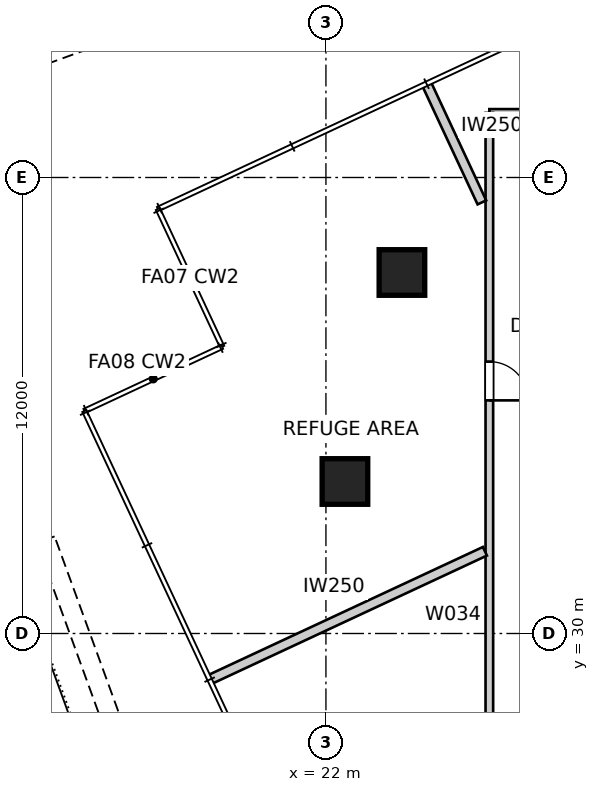
"""IFC4 building model, lengths in metres.
Left out: names, types, materials, properties, quantities, classifications, styles, units other than length and angle.
Written with IfcOpenShell. Run it as: python <this file> out.ifc"""

import sys

from ifc_helpers import new_model, si_unit, direction, frame, frame_2d, origin, origin_2d, place, context, subcontext, project, spatial, rectangle, extrude, element, fill, save


model = new_model("IFC4")
c1 = context("Model", 3, precision=1e-05, world=origin(), true_north=direction((0.0, 1.0)))
c2 = subcontext(c1, "Body", "Model", "MODEL_VIEW")
j1 = project(units=[si_unit("LENGTHUNIT", "METRE"), si_unit("PLANEANGLEUNIT", "RADIAN")], contexts=[c1])
p1 = place(None, origin())
s1 = spatial("IfcSite", under=j1, at=p1, CompositionType="ELEMENT")
p2 = place(p1, origin())
s2 = spatial("IfcBuilding", under=s1, at=p2, CompositionType="ELEMENT")
p3 = place(p2, frame((0.0, 0.0, 171.0)))
s3 = spatial("IfcBuildingStorey", under=s2, at=p3, CompositionType="ELEMENT", Elevation=171.0)
for number, where, z_axis, x_axis in (
    (1, (24.0, 39.5, 0.0), (0.0, 0.0, 1.0), (1.0, 0.0, 0.0)),
    (2, (22.5, 34.0, 0.0), (0.0, 0.0, 1.0), (1.0, 0.0, 0.0)),
):
    element("IfcColumn", number, at=place(p3, frame(where, z_axis=z_axis, x_axis=x_axis)), inside=s3, PredefinedType="COLUMN", context=c2, shape_type="SweptSolid", body=[
        extrude(rectangle(XDim=1.2, YDim=1.2, at=origin_2d()), origin(), (0.0, 0.0, 1.0), 5.0),
    ])
p4 = place(p3, frame((53.7, 43.7, 0.0), z_axis=(0.0, 0.0, 1.0), x_axis=(-1.0, 0.0, 0.0)))
e3 = element("IfcWall", 3, at=p4, inside=s3, PredefinedType="PARTITIONING", context=c2, shape_type="SweptSolid", body=[
    extrude(rectangle(XDim=27.4, YDim=0.2, at=frame_2d((13.7, 0.0))), origin(), (0.0, 0.0, 1.0), 4.85),
])
p5 = place(p4, frame((21.876, 0.0, 0.0)))
e4 = element("IfcOpeningElement", 4, at=p5, cuts=e3, PredefinedType="OPENING", context=c2, shape_type="SweptSolid", body=[
    extrude(rectangle(XDim=1.02, YDim=2.34, at=frame_2d((0.51, 1.17))), frame((0.0, 0.11, 0.0), z_axis=(0.0, -1.0, 0.0), x_axis=(1.0, 0.0, 0.0)), (0.0, 0.0, 1.0), 0.22),
])
p6 = place(p4, frame((6.219, 0.0, 0.0)))
e5 = element("IfcOpeningElement", 5, at=p6, cuts=e3, PredefinedType="OPENING", context=c2, shape_type="SweptSolid", body=[
    extrude(rectangle(XDim=1.02, YDim=2.34, at=frame_2d((0.51, 1.17))), frame((0.0, 0.11, 0.0), z_axis=(0.0, -1.0, 0.0), x_axis=(1.0, 0.0, 0.0)), (0.0, 0.0, 1.0), 0.22),
])
p7 = place(p4, frame((14.205, 0.0, 0.0)))
e6 = element("IfcOpeningElement", 6, at=p7, cuts=e3, PredefinedType="OPENING", context=c2, shape_type="SweptSolid", body=[
    extrude(rectangle(XDim=1.02, YDim=2.34, at=frame_2d((0.51, 1.17))), frame((0.0, 0.11, 0.0), z_axis=(0.0, -1.0, 0.0), x_axis=(1.0, 0.0, 0.0)), (0.0, 0.0, 1.0), 0.22),
])
p8 = place(p3, frame((26.3, 43.7, 0.0), z_axis=(0.0, 0.0, 1.0), x_axis=(0.0, -1.0, 0.0)))
e7 = element("IfcWall", 7, at=p8, inside=s3, PredefinedType="PARTITIONING", context=c2, shape_type="SweptSolid", body=[
    extrude(rectangle(XDim=27.7, YDim=0.2, at=frame_2d((13.85, 0.0))), origin(), (0.0, 0.0, 1.0), 4.85),
])
p9 = place(p8, frame((18.87, 0.0, 0.0)))
e8 = element("IfcOpeningElement", 8, at=p9, cuts=e7, PredefinedType="OPENING", context=c2, shape_type="SweptSolid", body=[
    extrude(rectangle(XDim=1.02, YDim=2.34, at=frame_2d((0.51, 1.17))), frame((0.0, 0.11, 0.0), z_axis=(0.0, -1.0, 0.0), x_axis=(1.0, 0.0, 0.0)), (0.0, 0.0, 1.0), 0.22),
])
p10 = place(p8, frame((6.545, 0.0, 0.0)))
e9 = element("IfcOpeningElement", 9, at=p10, cuts=e7, PredefinedType="OPENING", context=c2, shape_type="SweptSolid", body=[
    extrude(rectangle(XDim=1.02, YDim=2.34, at=frame_2d((0.51, 1.17))), frame((0.0, 0.11, 0.0), z_axis=(0.0, -1.0, 0.0), x_axis=(1.0, 0.0, 0.0)), (0.0, 0.0, 1.0), 0.22),
])
p11 = place(p3, frame((24.647, 44.467, 0.0), z_axis=(0.0, 0.0, 1.0), x_axis=(0.422586759932, -0.906322475905, 0.0)))
e10 = element("IfcWall", 10, at=p11, inside=s3, PredefinedType="PARTITIONING", context=c2, shape_type="SweptSolid", body=[
    extrude(rectangle(XDim=3.446, YDim=0.25, at=frame_2d((1.723, 0.0))), origin(), (0.0, 0.0, 1.0), 4.85),
])
p12 = place(p3, frame((18.94, 28.786, 0.0), z_axis=(0.0, 0.0, 1.0), x_axis=(0.906306405344, 0.422621224778, 0.0)))
e11 = element("IfcWall", 11, at=p12, inside=s3, PredefinedType="PARTITIONING", context=c2, shape_type="SweptSolid", body=[
    extrude(rectangle(XDim=7.992, YDim=0.25, at=frame_2d((3.996, 0.0))), origin(), (0.0, 0.0, 1.0), 4.85),
])
p13 = place(p10, origin())
e12 = element("IfcDoor", 12, at=p13, inside=s3, OperationType="SINGLE_SWING_RIGHT", PredefinedType="DOOR", context=c2, shape_type="SweptSolid", body=[
    extrude(rectangle(XDim=1.02, YDim=2.34, at=frame_2d((0.51, 1.17))), frame((0.0, 0.025, 0.0), z_axis=(0.0, -1.0, 0.0), x_axis=(1.0, 0.0, 0.0)), (0.0, 0.0, 1.0), 0.05),
])
fill(e9, e12)
save(model, sys.argv[1])
